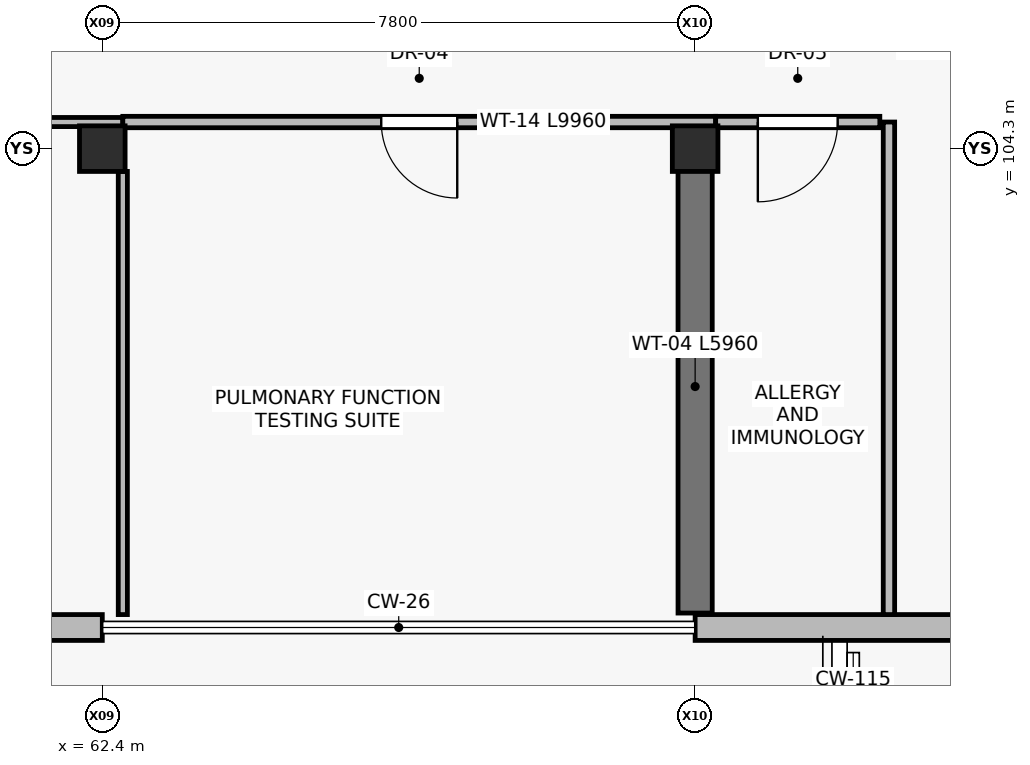
"""IFC4 building model, lengths in metres.
Left out: names, types, materials, properties, quantities, classifications, styles, units other than length and angle.
Written with IfcOpenShell. Run it as: python <this file> out.ifc"""

import sys

from ifc_helpers import new_model, si_unit, direction, frame, frame_2d, origin, origin_2d, place, context, subcontext, project, spatial, rectangle, extrude, element, fill, save


model = new_model("IFC4")
c1 = context("Model", 3, precision=1e-05, world=origin(), true_north=direction((0.0, 1.0)))
c2 = subcontext(c1, "Body", "Model", "MODEL_VIEW")
j1 = project(units=[si_unit("LENGTHUNIT", "METRE"), si_unit("PLANEANGLEUNIT", "RADIAN")], contexts=[c1])
p1 = place(None, origin())
s1 = spatial("IfcSite", under=j1, at=p1, CompositionType="ELEMENT")
p2 = place(p1, origin())
s2 = spatial("IfcBuilding", under=s1, at=p2, CompositionType="ELEMENT")
p3 = place(p2, frame((0.0, 0.0, 4.8)))
s3 = spatial("IfcBuildingStorey", under=s2, at=p3, CompositionType="ELEMENT", Elevation=4.8)
for number, where, z_axis, x_axis in (
    (1, (62.4, 104.3, 0.0), (0.0, 0.0, 1.0), (1.0, 0.0, 0.0)),
    (2, (70.2, 104.3, 0.0), (0.0, 0.0, 1.0), (1.0, 0.0, 0.0)),
):
    element("IfcColumn", number, at=place(p3, frame(where, z_axis=z_axis, x_axis=x_axis)), inside=s3, PredefinedType="COLUMN", context=c2, shape_type="SweptSolid", body=[
        extrude(rectangle(XDim=0.6, YDim=0.6, at=origin_2d()), origin(), (0.0, 0.0, 1.0), 4.8),
    ])
p4 = place(p3, frame((62.4, 98.0, 0.0), z_axis=(0.0, 0.0, 1.0), x_axis=(-1.0, 0.0, 0.0)))
e3 = element("IfcWall", 3, at=p4, inside=s3, PredefinedType="STANDARD", context=c2, shape_type="SweptSolid", body=[
    extrude(rectangle(XDim=7.8, YDim=0.34, at=frame_2d((3.9, 0.0))), origin(), (0.0, 0.0, 1.0), 4.54),
])
p5 = place(p4, frame((3.275, 0.0, 0.0)))
e4 = element("IfcOpeningElement", 4, at=p5, cuts=e3, PredefinedType="OPENING", context=c2, shape_type="SweptSolid", body=[
    extrude(rectangle(XDim=1.25, YDim=2.2, at=frame_2d((0.625, 1.1))), frame((0.0, 0.18, 0.0), z_axis=(0.0, -1.0, 0.0), x_axis=(1.0, 0.0, 0.0)), (0.0, 0.0, 1.0), 0.36),
])
p6 = place(p3, frame((78.0, 98.0, 0.0), z_axis=(0.0, 0.0, 1.0), x_axis=(-1.0, 0.0, 0.0)))
e5 = element("IfcWall", 5, at=p6, inside=s3, PredefinedType="STANDARD", context=c2, shape_type="SweptSolid", body=[
    extrude(rectangle(XDim=7.8, YDim=0.34, at=frame_2d((3.9, 0.0))), origin(), (0.0, 0.0, 1.0), 4.54),
])
p7 = place(p6, frame((2.8, 0.0, 0.0)))
e6 = element("IfcOpeningElement", 6, at=p7, cuts=e5, PredefinedType="OPENING", context=c2, shape_type="SweptSolid", body=[
    extrude(rectangle(XDim=1.6, YDim=2.2, at=frame_2d((0.8, 1.1))), frame((0.0, 0.18, 0.0), z_axis=(0.0, -1.0, 0.0), x_axis=(1.0, 0.0, 0.0)), (0.0, 0.0, 1.0), 0.36),
])
p8 = place(p3, frame((70.2, 98.19, 0.0), z_axis=(0.0, 0.0, 1.0), x_axis=(0.0, 1.0, 0.0)))
e7 = element("IfcWall", 7, at=p8, inside=s3, PredefinedType="SHEAR", context=c2, shape_type="SweptSolid", body=[
    extrude(rectangle(XDim=5.96, YDim=0.45, at=frame_2d((2.98, 0.0))), origin(), (0.0, 0.0, 1.0), 4.54),
])
p9 = place(p3, frame((72.75, 98.17, 0.0), z_axis=(0.0, 0.0, 1.0), x_axis=(0.0, 1.0, 0.0)))
e8 = element("IfcWall", 8, at=p9, inside=s3, PredefinedType="PARTITIONING", context=c2, shape_type="SweptSolid", body=[
    extrude(rectangle(XDim=6.48, YDim=0.15, at=frame_2d((3.24, 0.0))), origin(), (0.0, 0.0, 1.0), 4.21),
])
p10 = place(p3, frame((62.67, 104.65, 0.0), z_axis=(0.0, 0.0, 1.0), x_axis=(-1.0, 0.0, 0.0)))
e9 = element("IfcWall", 9, at=p10, inside=s3, PredefinedType="PARTITIONING", context=c2, shape_type="SweptSolid", body=[
    extrude(rectangle(XDim=4.95, YDim=0.12, at=frame_2d((2.475, 0.0))), origin(), (0.0, 0.0, 1.0), 4.04),
])
p11 = place(p10, frame((2.025, 0.0, 0.0)))
e10 = element("IfcOpeningElement", 10, at=p11, cuts=e9, PredefinedType="OPENING", context=c2, shape_type="SweptSolid", body=[
    extrude(rectangle(XDim=0.9, YDim=2.1, at=frame_2d((0.45, 1.05))), frame((0.0, 0.07, 0.0), z_axis=(0.0, -1.0, 0.0), x_axis=(1.0, 0.0, 0.0)), (0.0, 0.0, 1.0), 0.14),
])
p12 = place(p3, frame((70.47, 104.65, 0.0), z_axis=(0.0, 0.0, 1.0), x_axis=(-1.0, 0.0, 0.0)))
e11 = element("IfcWall", 11, at=p12, inside=s3, PredefinedType="PARTITIONING", context=c2, shape_type="SweptSolid", body=[
    extrude(rectangle(XDim=7.8, YDim=0.15, at=frame_2d((3.9, 0.0))), origin(), (0.0, 0.0, 1.0), 4.04),
])
p13 = place(p12, frame((3.4, 0.0, 0.0)))
e12 = element("IfcOpeningElement", 12, at=p13, cuts=e11, PredefinedType="OPENING", context=c2, shape_type="SweptSolid", body=[
    extrude(rectangle(XDim=1.0, YDim=2.1, at=frame_2d((0.5, 1.05))), frame((0.0, 0.085, 0.0), z_axis=(0.0, -1.0, 0.0), x_axis=(1.0, 0.0, 0.0)), (0.0, 0.0, 1.0), 0.17),
])
p14 = place(p3, frame((72.63, 104.65, 0.0), z_axis=(0.0, 0.0, 1.0), x_axis=(-1.0, 0.0, 0.0)))
e13 = element("IfcWall", 13, at=p14, inside=s3, PredefinedType="PARTITIONING", context=c2, shape_type="SweptSolid", body=[
    extrude(rectangle(XDim=2.16, YDim=0.15, at=frame_2d((1.08, 0.0))), origin(), (0.0, 0.0, 1.0), 4.04),
])
p15 = place(p14, frame((0.555, 0.0, 0.0)))
e14 = element("IfcOpeningElement", 14, at=p15, cuts=e13, PredefinedType="OPENING", context=c2, shape_type="SweptSolid", body=[
    extrude(rectangle(XDim=1.05, YDim=2.15, at=frame_2d((0.525, 1.075))), frame((0.0, 0.085, 0.0), z_axis=(0.0, -1.0, 0.0), x_axis=(1.0, 0.0, 0.0)), (0.0, 0.0, 1.0), 0.17),
])
p16 = place(p3, frame((62.67, 98.17, 0.0), z_axis=(0.0, 0.0, 1.0), x_axis=(0.0, 1.0, 0.0)))
e15 = element("IfcWall", 15, at=p16, inside=s3, PredefinedType="PARTITIONING", context=c2, shape_type="SweptSolid", body=[
    extrude(rectangle(XDim=5.83, YDim=0.12, at=frame_2d((2.915, 0.0))), origin(), (0.0, 0.0, 1.0), 4.09),
])
p17 = place(p13, origin())
e16 = element("IfcDoor", 16, at=p17, inside=s3, OperationType="SINGLE_SWING_LEFT", PredefinedType="DOOR", context=c2, shape_type="SweptSolid", body=[
    extrude(rectangle(XDim=1.0, YDim=2.1, at=frame_2d((0.5, 1.05))), frame((0.0, 0.025, 0.0), z_axis=(0.0, -1.0, 0.0), x_axis=(1.0, 0.0, 0.0)), (0.0, 0.0, 1.0), 0.05),
])
fill(e12, e16)
p18 = place(p15, origin())
e17 = element("IfcDoor", 17, at=p18, inside=s3, OperationType="SINGLE_SWING_RIGHT", PredefinedType="DOOR", context=c2, shape_type="SweptSolid", body=[
    extrude(rectangle(XDim=1.05, YDim=2.15, at=frame_2d((0.525, 1.075))), frame((0.0, 0.025, 0.0), z_axis=(0.0, -1.0, 0.0), x_axis=(1.0, 0.0, 0.0)), (0.0, 0.0, 1.0), 0.05),
])
fill(e14, e17)
save(model, sys.argv[1])
